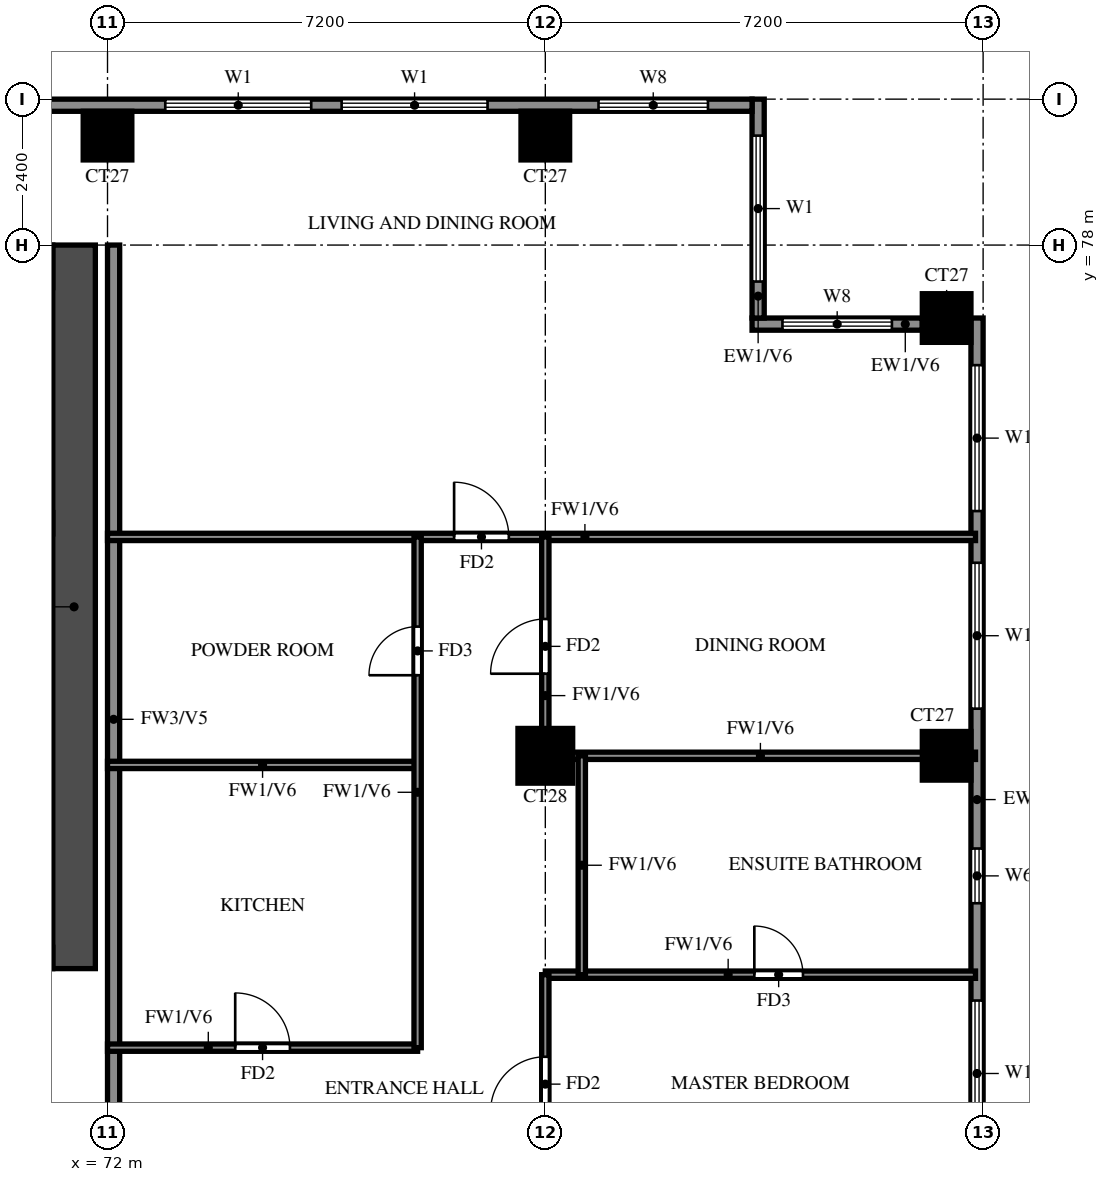
"""IFC4 building model, lengths in metres.
Left out: names, types, materials, properties, quantities, classifications, styles, units other than length and angle.
Written with IfcOpenShell. Run it as: python <this file> out.ifc"""

import sys

from ifc_helpers import new_model, si_unit, direction, frame, frame_2d, origin, origin_2d, place, context, subcontext, project, spatial, rectangle, extrude, source, transform, mapped, element, fill, save


model = new_model("IFC4")
c1 = context("Model", 3, precision=1e-05, world=origin(), true_north=direction((0.0, 1.0)))
c2 = subcontext(c1, "Body", "Model", "MODEL_VIEW")
j1 = project(units=[si_unit("LENGTHUNIT", "METRE"), si_unit("PLANEANGLEUNIT", "RADIAN")], contexts=[c1])
p1 = place(None, origin())
s1 = spatial("IfcSite", under=j1, at=p1, CompositionType="ELEMENT")
p2 = place(p1, origin())
s2 = spatial("IfcBuilding", under=s1, at=p2, CompositionType="ELEMENT")
p3 = place(p2, frame((0.0, 0.0, 202.5)))
s3 = spatial("IfcBuildingStorey", under=s2, at=p3, CompositionType="ELEMENT", Elevation=202.5)
m1 = source(origin(), c2, "Body", "SweptSolid", [
    extrude(rectangle(XDim=0.9, YDim=0.9, at=origin_2d()), origin(), (0.0, 0.0, 1.0), 3.1),
])
p4 = place(p3, frame((79.2, 69.6, 0.0), z_axis=(0.0, 0.0, 1.0), x_axis=(1.0, 0.0, 0.0)))
e1 = element("IfcColumn", 1, at=p4, inside=s3, PredefinedType="COLUMN", context=c2, shape_type="MappedRepresentation", body=[
    mapped(m1, transform((0.0, 0.0, 0.0))),
])
m2 = source(origin(), c2, "Body", "SweptSolid", [
    extrude(rectangle(XDim=0.8, YDim=0.8, at=origin_2d()), origin(), (0.0, 0.0, 1.0), 3.1),
])
for number, where, z_axis, x_axis in (
    (2, (85.8, 69.6, 0.0), (0.0, 0.0, 1.0), (1.0, 0.0, 0.0)),
    (3, (85.8, 76.8, 0.0), (0.0, 0.0, 1.0), (1.0, 0.0, 0.0)),
    (4, (72.0, 79.8, 0.0), (0.0, 0.0, 1.0), (1.0, 0.0, 0.0)),
    (5, (79.2, 79.8, 0.0), (0.0, 0.0, 1.0), (1.0, 0.0, 0.0)),
):
    element("IfcColumn", number, at=place(p3, frame(where, z_axis=z_axis, x_axis=x_axis)), inside=s3, PredefinedType="COLUMN", context=c2, shape_type="MappedRepresentation", body=[
        mapped(m2, transform((0.0, 0.0, 0.0))),
    ])
p5 = place(p3, frame((71.45, 66.1, 0.0), z_axis=(0.0, 0.0, 1.0), x_axis=(0.0, 1.0, 0.0)))
e6 = element("IfcWall", 6, at=p5, inside=s3, PredefinedType="SHEAR", context=c2, shape_type="SweptSolid", body=[
    extrude(rectangle(XDim=11.9, YDim=0.7, at=frame_2d((5.95, 0.0))), origin(), (0.0, 0.0, 1.0), 3.1),
])
p6 = place(p3, frame((29.7, 77.65, 0.0), z_axis=(0.0, 0.0, 1.0), x_axis=(1.0, 0.0, 0.0)))
e7 = element("IfcWall", 7, at=p6, inside=s3, PredefinedType="SHEAR", context=c2, shape_type="SweptSolid", body=[
    extrude(rectangle(XDim=41.4, YDim=0.7, at=frame_2d((20.7, 0.0))), origin(), (0.0, 0.0, 1.0), 3.1),
])
p7 = place(p3, frame((29.7, 66.275, 0.0), z_axis=(0.0, 0.0, 1.0), x_axis=(1.0, 0.0, 0.0)))
e8 = element("IfcWall", 8, at=p7, inside=s3, PredefinedType="SHEAR", context=c2, shape_type="SweptSolid", body=[
    extrude(rectangle(XDim=41.4, YDim=0.35, at=frame_2d((20.7, 0.0))), origin(), (0.0, 0.0, 1.0), 3.1),
])
p8 = place(p7, frame((0.925, 0.0, 0.0)))
e9 = element("IfcOpeningElement", 9, at=p8, cuts=e8, PredefinedType="OPENING", context=c2, shape_type="SweptSolid", body=[
    extrude(rectangle(XDim=1.1, YDim=2.1, at=frame_2d((0.55, 1.05))), frame((0.0, 0.185, 0.0), z_axis=(0.0, -1.0, 0.0), x_axis=(1.0, 0.0, 0.0)), (0.0, 0.0, 1.0), 0.37),
])
p9 = place(p7, frame((3.712, 0.0, 0.0)))
e10 = element("IfcOpeningElement", 10, at=p9, cuts=e8, PredefinedType="OPENING", context=c2, shape_type="SweptSolid", body=[
    extrude(rectangle(XDim=1.8, YDim=2.1, at=frame_2d((0.9, 1.05))), frame((0.0, 0.185, 0.0), z_axis=(0.0, -1.0, 0.0), x_axis=(1.0, 0.0, 0.0)), (0.0, 0.0, 1.0), 0.37),
])
p10 = place(p3, frame((86.3, 62.4, 0.0), z_axis=(0.0, 0.0, 1.0), x_axis=(0.0, 1.0, 0.0)))
e11 = element("IfcWall", 11, at=p10, inside=s3, PredefinedType="SOLIDWALL", context=c2, shape_type="SweptSolid", body=[
    extrude(rectangle(XDim=14.4, YDim=0.2, at=frame_2d((7.2, 0.0))), origin(), (0.0, 0.0, 1.0), 3.1),
])
p11 = place(p10, frame((0.775, 0.0, 0.6)))
e12 = element("IfcOpeningElement", 12, at=p11, cuts=e11, PredefinedType="OPENING", context=c2, shape_type="SweptSolid", body=[
    extrude(rectangle(XDim=2.4, YDim=2.4, at=frame_2d((1.2, 1.2))), frame((0.0, 0.11, 0.0), z_axis=(0.0, -1.0, 0.0), x_axis=(1.0, 0.0, 0.0)), (0.0, 0.0, 1.0), 0.22),
])
p12 = place(p10, frame((4.775, 0.0, 1.5)))
e13 = element("IfcOpeningElement", 13, at=p12, cuts=e11, PredefinedType="OPENING", context=c2, shape_type="SweptSolid", body=[
    extrude(rectangle(XDim=0.9, YDim=0.9, at=frame_2d((0.45, 0.45))), frame((0.0, 0.11, 0.0), z_axis=(0.0, -1.0, 0.0), x_axis=(1.0, 0.0, 0.0)), (0.0, 0.0, 1.0), 0.22),
])
p13 = place(p10, frame((7.975, 0.0, 0.6)))
e14 = element("IfcOpeningElement", 14, at=p13, cuts=e11, PredefinedType="OPENING", context=c2, shape_type="SweptSolid", body=[
    extrude(rectangle(XDim=2.4, YDim=2.4, at=frame_2d((1.2, 1.2))), frame((0.0, 0.11, 0.0), z_axis=(0.0, -1.0, 0.0), x_axis=(1.0, 0.0, 0.0)), (0.0, 0.0, 1.0), 0.22),
])
p14 = place(p10, frame((11.225, 0.0, 0.6)))
e15 = element("IfcOpeningElement", 15, at=p14, cuts=e11, PredefinedType="OPENING", context=c2, shape_type="SweptSolid", body=[
    extrude(rectangle(XDim=2.4, YDim=2.4, at=frame_2d((1.2, 1.2))), frame((0.0, 0.11, 0.0), z_axis=(0.0, -1.0, 0.0), x_axis=(1.0, 0.0, 0.0)), (0.0, 0.0, 1.0), 0.22),
])
p15 = place(p3, frame((85.4, 76.7, 0.0), z_axis=(0.0, 0.0, 1.0), x_axis=(-1.0, 0.0, 0.0)))
e16 = element("IfcWall", 16, at=p15, inside=s3, PredefinedType="SOLIDWALL", context=c2, shape_type="SweptSolid", body=[
    extrude(rectangle(XDim=2.8, YDim=0.2, at=frame_2d((1.4, 0.0))), origin(), (0.0, 0.0, 1.0), 3.1),
])
p16 = place(p15, frame((0.5, 0.0, 0.6)))
e17 = element("IfcOpeningElement", 17, at=p16, cuts=e16, PredefinedType="OPENING", context=c2, shape_type="SweptSolid", body=[
    extrude(rectangle(XDim=1.8, YDim=2.4, at=frame_2d((0.9, 1.2))), frame((0.0, 0.11, 0.0), z_axis=(0.0, -1.0, 0.0), x_axis=(1.0, 0.0, 0.0)), (0.0, 0.0, 1.0), 0.22),
])
p17 = place(p3, frame((82.7, 76.8, 0.0), z_axis=(0.0, 0.0, 1.0), x_axis=(0.0, 1.0, 0.0)))
e18 = element("IfcWall", 18, at=p17, inside=s3, PredefinedType="SOLIDWALL", context=c2, shape_type="SweptSolid", body=[
    extrude(rectangle(XDim=3.6, YDim=0.2, at=frame_2d((1.8, 0.0))), origin(), (0.0, 0.0, 1.0), 3.1),
])
p18 = place(p17, frame((0.6, 0.0, 0.6)))
e19 = element("IfcOpeningElement", 19, at=p18, cuts=e18, PredefinedType="OPENING", context=c2, shape_type="SweptSolid", body=[
    extrude(rectangle(XDim=2.4, YDim=2.4, at=frame_2d((1.2, 1.2))), frame((0.0, 0.11, 0.0), z_axis=(0.0, -1.0, 0.0), x_axis=(1.0, 0.0, 0.0)), (0.0, 0.0, 1.0), 0.22),
])
p19 = place(p3, frame((82.6, 80.3, 0.0), z_axis=(0.0, 0.0, 1.0), x_axis=(-1.0, 0.0, 0.0)))
e20 = element("IfcWall", 20, at=p19, inside=s3, PredefinedType="SOLIDWALL", context=c2, shape_type="SweptSolid", body=[
    extrude(rectangle(XDim=64.6, YDim=0.2, at=frame_2d((32.3, 0.0))), origin(), (0.0, 0.0, 1.0), 3.1),
])
p20 = place(p19, frame((54.7, 0.0, 0.0)))
e21 = element("IfcOpeningElement", 21, at=p20, cuts=e20, PredefinedType="OPENING", context=c2, shape_type="SweptSolid", body=[
    extrude(rectangle(XDim=1.8, YDim=2.4, at=frame_2d((0.9, 1.2))), frame((0.0, 0.11, 0.0), z_axis=(0.0, -1.0, 0.0), x_axis=(1.0, 0.0, 0.0)), (0.0, 0.0, 1.0), 0.22),
])
p21 = place(p19, frame((56.95, 0.0, 0.6)))
e22 = element("IfcOpeningElement", 22, at=p21, cuts=e20, PredefinedType="OPENING", context=c2, shape_type="SweptSolid", body=[
    extrude(rectangle(XDim=0.9, YDim=2.4, at=frame_2d((0.45, 1.2))), frame((0.0, 0.11, 0.0), z_axis=(0.0, -1.0, 0.0), x_axis=(1.0, 0.0, 0.0)), (0.0, 0.0, 1.0), 0.22),
])
p22 = place(p19, frame((58.725, 0.0, 0.6)))
e23 = element("IfcOpeningElement", 23, at=p22, cuts=e20, PredefinedType="OPENING", context=c2, shape_type="SweptSolid", body=[
    extrude(rectangle(XDim=1.8, YDim=2.4, at=frame_2d((0.9, 1.2))), frame((0.0, 0.11, 0.0), z_axis=(0.0, -1.0, 0.0), x_axis=(1.0, 0.0, 0.0)), (0.0, 0.0, 1.0), 0.22),
])
p23 = place(p19, frame((61.975, 0.0, 0.6)))
e24 = element("IfcOpeningElement", 24, at=p23, cuts=e20, PredefinedType="OPENING", context=c2, shape_type="SweptSolid", body=[
    extrude(rectangle(XDim=1.8, YDim=2.4, at=frame_2d((0.9, 1.2))), frame((0.0, 0.11, 0.0), z_axis=(0.0, -1.0, 0.0), x_axis=(1.0, 0.0, 0.0)), (0.0, 0.0, 1.0), 0.22),
])
p24 = place(p19, frame((0.725, 0.0, 0.6)))
e25 = element("IfcOpeningElement", 25, at=p24, cuts=e20, PredefinedType="OPENING", context=c2, shape_type="SweptSolid", body=[
    extrude(rectangle(XDim=1.8, YDim=2.4, at=frame_2d((0.9, 1.2))), frame((0.0, 0.11, 0.0), z_axis=(0.0, -1.0, 0.0), x_axis=(1.0, 0.0, 0.0)), (0.0, 0.0, 1.0), 0.22),
])
p25 = place(p19, frame((4.35, 0.0, 0.6)))
e26 = element("IfcOpeningElement", 26, at=p25, cuts=e20, PredefinedType="OPENING", context=c2, shape_type="SweptSolid", body=[
    extrude(rectangle(XDim=2.4, YDim=2.4, at=frame_2d((1.2, 1.2))), frame((0.0, 0.11, 0.0), z_axis=(0.0, -1.0, 0.0), x_axis=(1.0, 0.0, 0.0)), (0.0, 0.0, 1.0), 0.22),
])
p26 = place(p19, frame((7.25, 0.0, 0.6)))
e27 = element("IfcOpeningElement", 27, at=p26, cuts=e20, PredefinedType="OPENING", context=c2, shape_type="SweptSolid", body=[
    extrude(rectangle(XDim=2.4, YDim=2.4, at=frame_2d((1.2, 1.2))), frame((0.0, 0.11, 0.0), z_axis=(0.0, -1.0, 0.0), x_axis=(1.0, 0.0, 0.0)), (0.0, 0.0, 1.0), 0.22),
])
p27 = place(p3, frame((72.1, 62.4, 0.0), z_axis=(0.0, 0.0, 1.0), x_axis=(0.0, 1.0, 0.0)))
e28 = element("IfcWall", 28, at=p27, inside=s3, PredefinedType="SOLIDWALL", context=c2, shape_type="SweptSolid", body=[
    extrude(rectangle(XDim=15.6, YDim=0.2, at=frame_2d((7.8, 0.0))), origin(), (0.0, 0.0, 1.0), 3.1),
])
p28 = place(p3, frame((72.0, 64.8, 0.0), z_axis=(0.0, 0.0, 1.0), x_axis=(1.0, 0.0, 0.0)))
e29 = element("IfcWall", 29, at=p28, inside=s3, PredefinedType="PARTITIONING", context=c2, shape_type="SweptSolid", body=[
    extrude(rectangle(XDim=5.1, YDim=0.12, at=frame_2d((2.55, 0.0))), origin(), (0.0, 0.0, 1.0), 3.1),
])
p29 = place(p28, frame((2.1, 0.0, 0.0)))
e30 = element("IfcOpeningElement", 30, at=p29, cuts=e29, PredefinedType="OPENING", context=c2, shape_type="SweptSolid", body=[
    extrude(rectangle(XDim=0.9, YDim=2.1, at=frame_2d((0.45, 1.05))), frame((0.0, 0.07, 0.0), z_axis=(0.0, -1.0, 0.0), x_axis=(1.0, 0.0, 0.0)), (0.0, 0.0, 1.0), 0.14),
])
p30 = place(p3, frame((79.2, 66.0, 0.0), z_axis=(0.0, 0.0, 1.0), x_axis=(1.0, 0.0, 0.0)))
e31 = element("IfcWall", 31, at=p30, inside=s3, PredefinedType="PARTITIONING", context=c2, shape_type="SweptSolid", body=[
    extrude(rectangle(XDim=7.075, YDim=0.12, at=frame_2d((3.538, 0.0))), origin(), (0.0, 0.0, 1.0), 3.1),
])
p31 = place(p30, frame((3.438, 0.0, 0.0)))
e32 = element("IfcOpeningElement", 32, at=p31, cuts=e31, PredefinedType="OPENING", context=c2, shape_type="SweptSolid", body=[
    extrude(rectangle(XDim=0.8, YDim=2.1, at=frame_2d((0.4, 1.05))), frame((0.0, 0.07, 0.0), z_axis=(0.0, -1.0, 0.0), x_axis=(1.0, 0.0, 0.0)), (0.0, 0.0, 1.0), 0.14),
])
p32 = place(p3, frame((72.0, 69.45, 0.0), z_axis=(0.0, 0.0, 1.0), x_axis=(1.0, 0.0, 0.0)))
e33 = element("IfcWall", 33, at=p32, inside=s3, PredefinedType="PARTITIONING", context=c2, shape_type="SweptSolid", body=[
    extrude(rectangle(XDim=5.1, YDim=0.12, at=frame_2d((2.55, 0.0))), origin(), (0.0, 0.0, 1.0), 3.1),
])
p33 = place(p3, frame((79.2, 69.6, 0.0), z_axis=(0.0, 0.0, 1.0), x_axis=(1.0, 0.0, 0.0)))
e34 = element("IfcWall", 34, at=p33, inside=s3, PredefinedType="PARTITIONING", context=c2, shape_type="SweptSolid", body=[
    extrude(rectangle(XDim=7.075, YDim=0.12, at=frame_2d((3.538, 0.0))), origin(), (0.0, 0.0, 1.0), 3.1),
])
p34 = place(p3, frame((72.0, 73.2, 0.0), z_axis=(0.0, 0.0, 1.0), x_axis=(1.0, 0.0, 0.0)))
e35 = element("IfcWall", 35, at=p34, inside=s3, PredefinedType="PARTITIONING", context=c2, shape_type="SweptSolid", body=[
    extrude(rectangle(XDim=14.275, YDim=0.12, at=frame_2d((7.137, 0.0))), origin(), (0.0, 0.0, 1.0), 3.1),
])
p35 = place(p34, frame((5.7, 0.0, 0.0)))
e36 = element("IfcOpeningElement", 36, at=p35, cuts=e35, PredefinedType="OPENING", context=c2, shape_type="SweptSolid", body=[
    extrude(rectangle(XDim=0.9, YDim=2.1, at=frame_2d((0.45, 1.05))), frame((0.0, 0.07, 0.0), z_axis=(0.0, -1.0, 0.0), x_axis=(1.0, 0.0, 0.0)), (0.0, 0.0, 1.0), 0.14),
])
p36 = place(p3, frame((77.1, 64.8, 0.0), z_axis=(0.0, 0.0, 1.0), x_axis=(0.0, 1.0, 0.0)))
e37 = element("IfcWall", 37, at=p36, inside=s3, PredefinedType="PARTITIONING", context=c2, shape_type="SweptSolid", body=[
    extrude(rectangle(XDim=8.4, YDim=0.12, at=frame_2d((4.2, 0.0))), origin(), (0.0, 0.0, 1.0), 3.1),
])
p37 = place(p36, frame((6.125, 0.0, 0.0)))
e38 = element("IfcOpeningElement", 38, at=p37, cuts=e37, PredefinedType="OPENING", context=c2, shape_type="SweptSolid", body=[
    extrude(rectangle(XDim=0.8, YDim=2.1, at=frame_2d((0.4, 1.05))), frame((0.0, 0.07, 0.0), z_axis=(0.0, -1.0, 0.0), x_axis=(1.0, 0.0, 0.0)), (0.0, 0.0, 1.0), 0.14),
])
p38 = place(p3, frame((79.2, 55.2, 0.0), z_axis=(0.0, 0.0, 1.0), x_axis=(0.0, 1.0, 0.0)))
e39 = element("IfcWall", 39, at=p38, inside=s3, PredefinedType="PARTITIONING", context=c2, shape_type="SweptSolid", body=[
    extrude(rectangle(XDim=10.8, YDim=0.12, at=frame_2d((5.4, 0.0))), origin(), (0.0, 0.0, 1.0), 3.1),
])
p39 = place(p38, frame((2.85, 0.0, 0.0)))
e40 = element("IfcOpeningElement", 40, at=p39, cuts=e39, PredefinedType="OPENING", context=c2, shape_type="SweptSolid", body=[
    extrude(rectangle(XDim=1.5, YDim=2.1, at=frame_2d((0.75, 1.05))), frame((0.0, 0.07, 0.0), z_axis=(0.0, -1.0, 0.0), x_axis=(1.0, 0.0, 0.0)), (0.0, 0.0, 1.0), 0.14),
])
p40 = place(p38, frame((8.55, 0.0, 0.0)))
e41 = element("IfcOpeningElement", 41, at=p40, cuts=e39, PredefinedType="OPENING", context=c2, shape_type="SweptSolid", body=[
    extrude(rectangle(XDim=0.9, YDim=2.1, at=frame_2d((0.45, 1.05))), frame((0.0, 0.07, 0.0), z_axis=(0.0, -1.0, 0.0), x_axis=(1.0, 0.0, 0.0)), (0.0, 0.0, 1.0), 0.14),
])
p41 = place(p3, frame((79.2, 69.6, 0.0), z_axis=(0.0, 0.0, 1.0), x_axis=(0.0, 1.0, 0.0)))
e42 = element("IfcWall", 42, at=p41, inside=s3, PredefinedType="PARTITIONING", context=c2, shape_type="SweptSolid", body=[
    extrude(rectangle(XDim=3.6, YDim=0.12, at=frame_2d((1.8, 0.0))), origin(), (0.0, 0.0, 1.0), 3.1),
])
p42 = place(p41, frame((1.35, 0.0, 0.0)))
e43 = element("IfcOpeningElement", 43, at=p42, cuts=e42, PredefinedType="OPENING", context=c2, shape_type="SweptSolid", body=[
    extrude(rectangle(XDim=0.9, YDim=2.1, at=frame_2d((0.45, 1.05))), frame((0.0, 0.07, 0.0), z_axis=(0.0, -1.0, 0.0), x_axis=(1.0, 0.0, 0.0)), (0.0, 0.0, 1.0), 0.14),
])
p43 = place(p3, frame((79.8, 66.0, 0.0), z_axis=(0.0, 0.0, 1.0), x_axis=(0.0, 1.0, 0.0)))
e44 = element("IfcWall", 44, at=p43, inside=s3, PredefinedType="PARTITIONING", context=c2, shape_type="SweptSolid", body=[
    extrude(rectangle(XDim=3.6, YDim=0.12, at=frame_2d((1.8, 0.0))), origin(), (0.0, 0.0, 1.0), 3.1),
])
p44 = place(p11, origin())
e45 = element("IfcWindow", 45, at=p44, inside=s3, PartitioningType="DOUBLE_PANEL_VERTICAL", PredefinedType="WINDOW", context=c2, shape_type="SweptSolid", body=[
    extrude(rectangle(XDim=2.4, YDim=2.4, at=frame_2d((1.2, 1.2))), frame((0.0, 0.03, 0.0), z_axis=(0.0, -1.0, 0.0), x_axis=(1.0, 0.0, 0.0)), (0.0, 0.0, 1.0), 0.06),
])
fill(e12, e45)
p45 = place(p12, origin())
e46 = element("IfcWindow", 46, at=p45, inside=s3, PartitioningType="SINGLE_PANEL", PredefinedType="WINDOW", context=c2, shape_type="SweptSolid", body=[
    extrude(rectangle(XDim=0.9, YDim=0.9, at=frame_2d((0.45, 0.45))), frame((0.0, 0.03, 0.0), z_axis=(0.0, -1.0, 0.0), x_axis=(1.0, 0.0, 0.0)), (0.0, 0.0, 1.0), 0.06),
])
fill(e13, e46)
p46 = place(p13, origin())
e47 = element("IfcWindow", 47, at=p46, inside=s3, PartitioningType="DOUBLE_PANEL_VERTICAL", PredefinedType="WINDOW", context=c2, shape_type="SweptSolid", body=[
    extrude(rectangle(XDim=2.4, YDim=2.4, at=frame_2d((1.2, 1.2))), frame((0.0, 0.03, 0.0), z_axis=(0.0, -1.0, 0.0), x_axis=(1.0, 0.0, 0.0)), (0.0, 0.0, 1.0), 0.06),
])
fill(e14, e47)
p47 = place(p14, origin())
e48 = element("IfcWindow", 48, at=p47, inside=s3, PartitioningType="DOUBLE_PANEL_VERTICAL", PredefinedType="WINDOW", context=c2, shape_type="SweptSolid", body=[
    extrude(rectangle(XDim=2.4, YDim=2.4, at=frame_2d((1.2, 1.2))), frame((0.0, 0.03, 0.0), z_axis=(0.0, -1.0, 0.0), x_axis=(1.0, 0.0, 0.0)), (0.0, 0.0, 1.0), 0.06),
])
fill(e15, e48)
p48 = place(p16, origin())
e49 = element("IfcWindow", 49, at=p48, inside=s3, PartitioningType="DOUBLE_PANEL_VERTICAL", PredefinedType="WINDOW", context=c2, shape_type="SweptSolid", body=[
    extrude(rectangle(XDim=1.8, YDim=2.4, at=frame_2d((0.9, 1.2))), frame((0.0, 0.03, 0.0), z_axis=(0.0, -1.0, 0.0), x_axis=(1.0, 0.0, 0.0)), (0.0, 0.0, 1.0), 0.06),
])
fill(e17, e49)
p49 = place(p18, origin())
e50 = element("IfcWindow", 50, at=p49, inside=s3, PartitioningType="DOUBLE_PANEL_VERTICAL", PredefinedType="WINDOW", context=c2, shape_type="SweptSolid", body=[
    extrude(rectangle(XDim=2.4, YDim=2.4, at=frame_2d((1.2, 1.2))), frame((0.0, 0.03, 0.0), z_axis=(0.0, -1.0, 0.0), x_axis=(1.0, 0.0, 0.0)), (0.0, 0.0, 1.0), 0.06),
])
fill(e19, e50)
p50 = place(p24, origin())
e51 = element("IfcWindow", 51, at=p50, inside=s3, PartitioningType="DOUBLE_PANEL_VERTICAL", PredefinedType="WINDOW", context=c2, shape_type="SweptSolid", body=[
    extrude(rectangle(XDim=1.8, YDim=2.4, at=frame_2d((0.9, 1.2))), frame((0.0, 0.03, 0.0), z_axis=(0.0, -1.0, 0.0), x_axis=(1.0, 0.0, 0.0)), (0.0, 0.0, 1.0), 0.06),
])
fill(e25, e51)
p51 = place(p25, origin())
e52 = element("IfcWindow", 52, at=p51, inside=s3, PartitioningType="DOUBLE_PANEL_VERTICAL", PredefinedType="WINDOW", context=c2, shape_type="SweptSolid", body=[
    extrude(rectangle(XDim=2.4, YDim=2.4, at=frame_2d((1.2, 1.2))), frame((0.0, 0.03, 0.0), z_axis=(0.0, -1.0, 0.0), x_axis=(1.0, 0.0, 0.0)), (0.0, 0.0, 1.0), 0.06),
])
fill(e26, e52)
p52 = place(p26, origin())
e53 = element("IfcWindow", 53, at=p52, inside=s3, PartitioningType="DOUBLE_PANEL_VERTICAL", PredefinedType="WINDOW", context=c2, shape_type="SweptSolid", body=[
    extrude(rectangle(XDim=2.4, YDim=2.4, at=frame_2d((1.2, 1.2))), frame((0.0, 0.03, 0.0), z_axis=(0.0, -1.0, 0.0), x_axis=(1.0, 0.0, 0.0)), (0.0, 0.0, 1.0), 0.06),
])
fill(e27, e53)
p53 = place(p40, origin())
e54 = element("IfcDoor", 54, at=p53, inside=s3, OperationType="SINGLE_SWING_RIGHT", PredefinedType="DOOR", context=c2, shape_type="SweptSolid", body=[
    extrude(rectangle(XDim=0.9, YDim=2.1, at=frame_2d((0.45, 1.05))), frame((0.0, 0.025, 0.0), z_axis=(0.0, -1.0, 0.0), x_axis=(1.0, 0.0, 0.0)), (0.0, 0.0, 1.0), 0.05),
])
fill(e41, e54)
p54 = place(p31, origin())
e55 = element("IfcDoor", 55, at=p54, inside=s3, OperationType="SINGLE_SWING_LEFT", PredefinedType="DOOR", context=c2, shape_type="SweptSolid", body=[
    extrude(rectangle(XDim=0.8, YDim=2.1, at=frame_2d((0.4, 1.05))), frame((0.0, 0.025, 0.0), z_axis=(0.0, -1.0, 0.0), x_axis=(1.0, 0.0, 0.0)), (0.0, 0.0, 1.0), 0.05),
])
fill(e32, e55)
p55 = place(p42, origin())
e56 = element("IfcDoor", 56, at=p55, inside=s3, OperationType="SINGLE_SWING_LEFT", PredefinedType="DOOR", context=c2, shape_type="SweptSolid", body=[
    extrude(rectangle(XDim=0.9, YDim=2.1, at=frame_2d((0.45, 1.05))), frame((0.0, 0.025, 0.0), z_axis=(0.0, -1.0, 0.0), x_axis=(1.0, 0.0, 0.0)), (0.0, 0.0, 1.0), 0.05),
])
fill(e43, e56)
p56 = place(p35, origin())
e57 = element("IfcDoor", 57, at=p56, inside=s3, OperationType="SINGLE_SWING_RIGHT", PredefinedType="DOOR", context=c2, shape_type="SweptSolid", body=[
    extrude(rectangle(XDim=0.9, YDim=2.1, at=frame_2d((0.45, 1.05))), frame((0.0, 0.025, 0.0), z_axis=(0.0, -1.0, 0.0), x_axis=(1.0, 0.0, 0.0)), (0.0, 0.0, 1.0), 0.05),
])
fill(e36, e57)
p57 = place(p29, origin())
e58 = element("IfcDoor", 58, at=p57, inside=s3, OperationType="SINGLE_SWING_LEFT", PredefinedType="DOOR", context=c2, shape_type="SweptSolid", body=[
    extrude(rectangle(XDim=0.9, YDim=2.1, at=frame_2d((0.45, 1.05))), frame((0.0, 0.025, 0.0), z_axis=(0.0, -1.0, 0.0), x_axis=(1.0, 0.0, 0.0)), (0.0, 0.0, 1.0), 0.05),
])
fill(e30, e58)
p58 = place(p37, origin())
e59 = element("IfcDoor", 59, at=p58, inside=s3, OperationType="SINGLE_SWING_LEFT", PredefinedType="DOOR", context=c2, shape_type="SweptSolid", body=[
    extrude(rectangle(XDim=0.8, YDim=2.1, at=frame_2d((0.4, 1.05))), frame((0.0, 0.025, 0.0), z_axis=(0.0, -1.0, 0.0), x_axis=(1.0, 0.0, 0.0)), (0.0, 0.0, 1.0), 0.05),
])
fill(e38, e59)
save(model, sys.argv[1])
